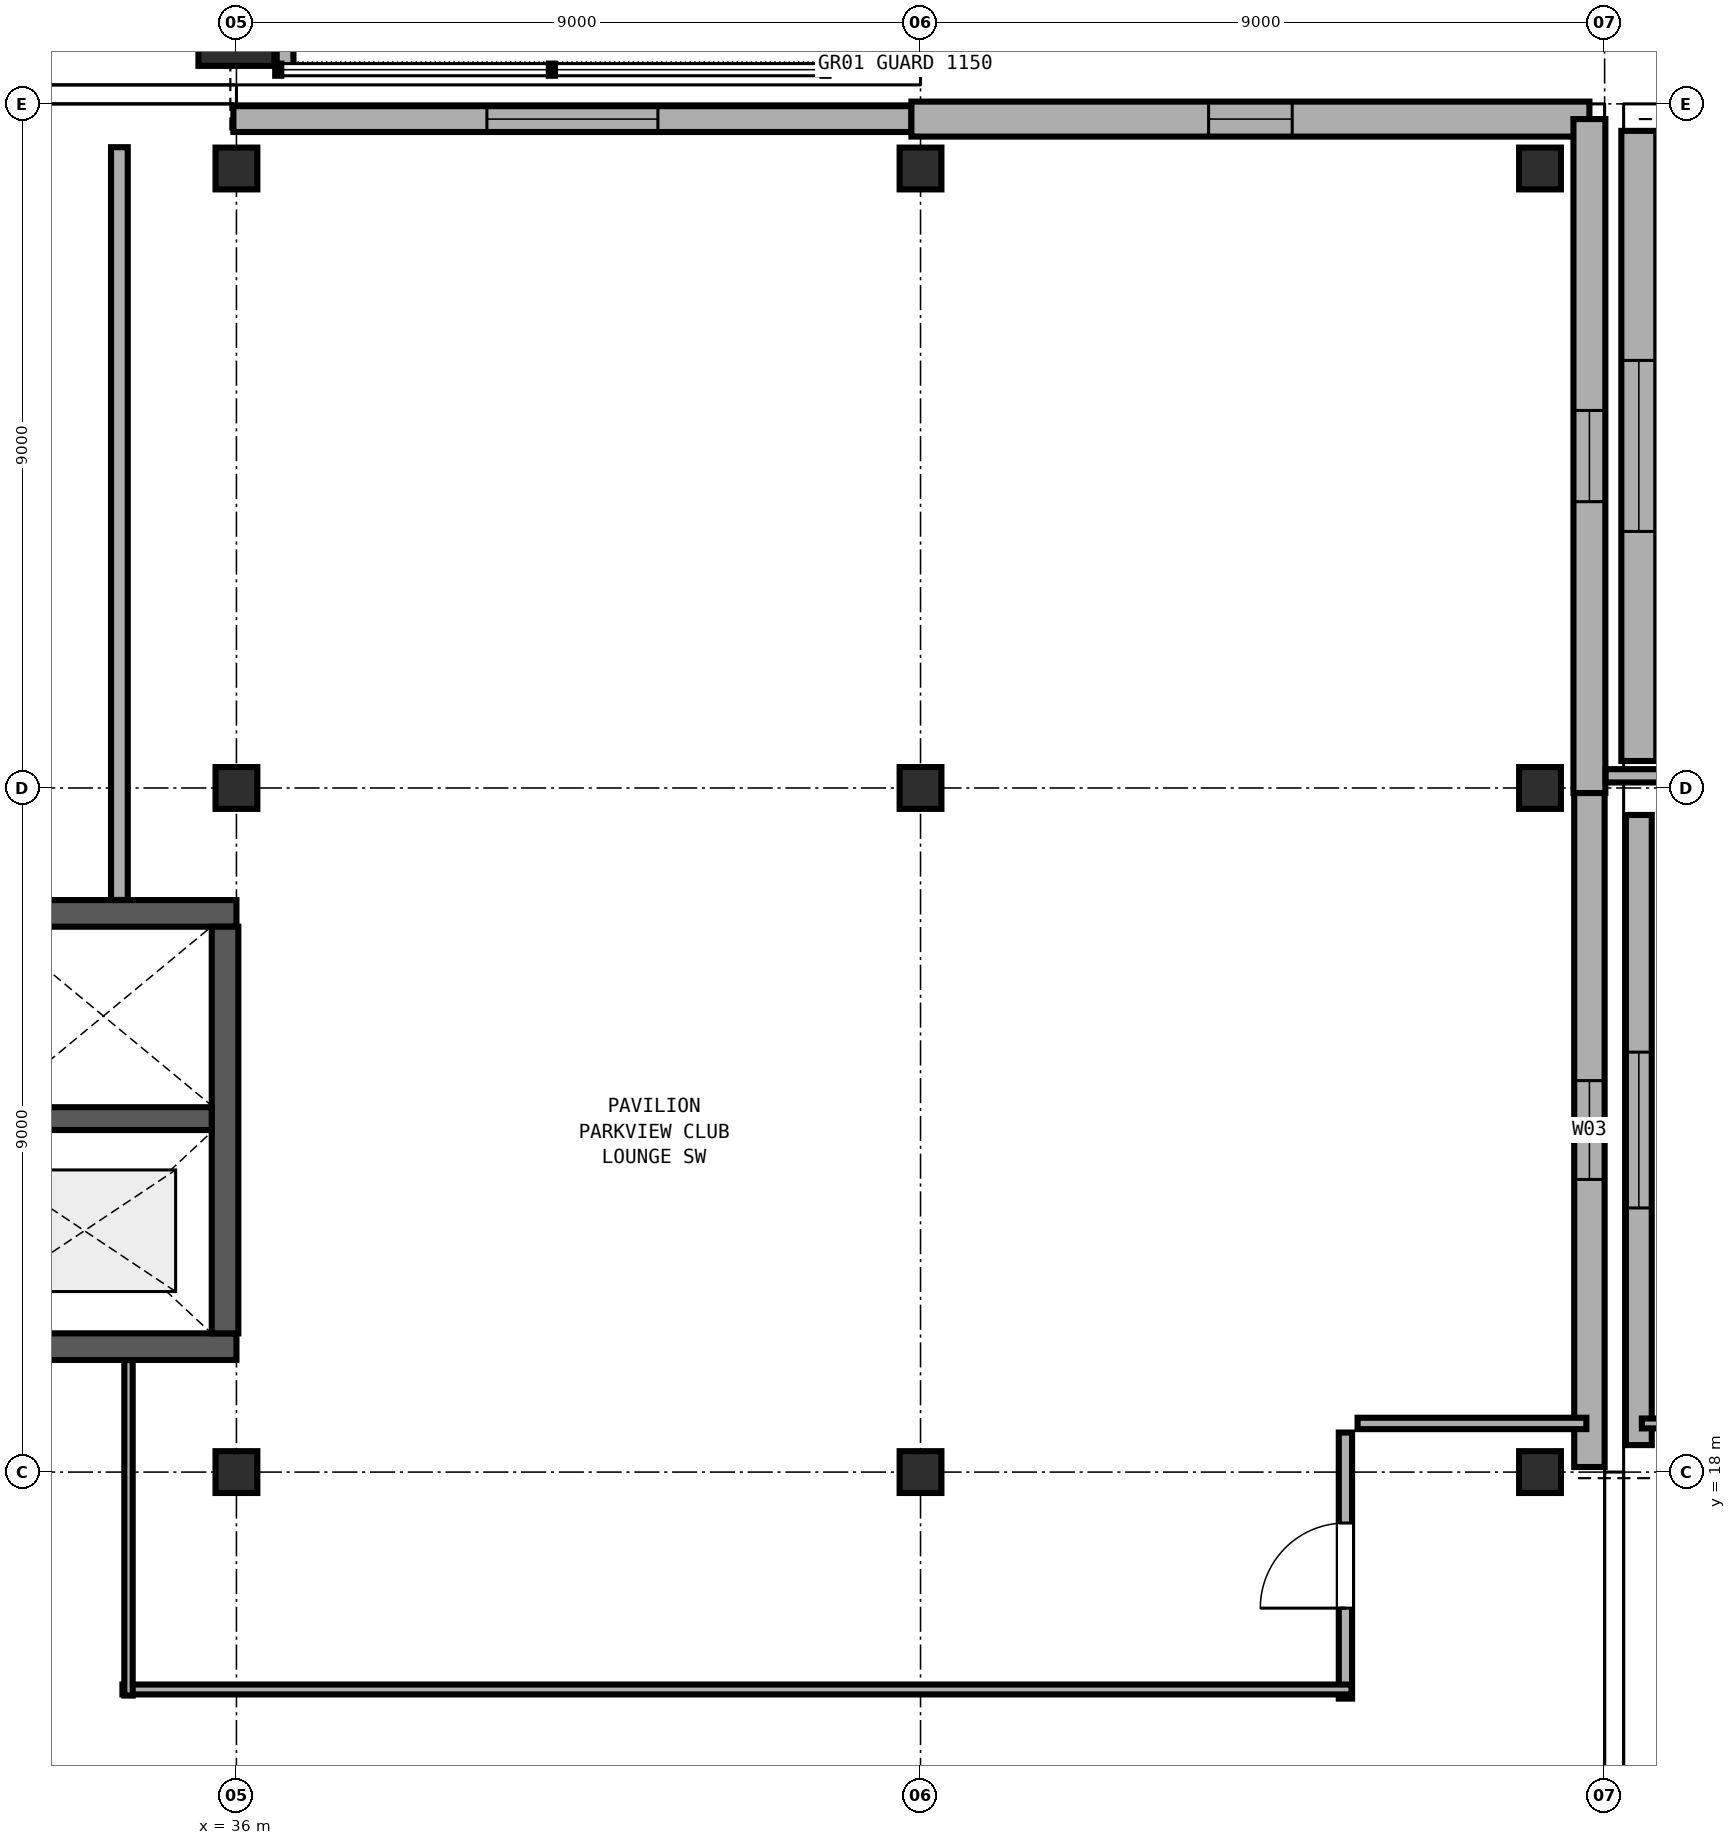
"""IFC4 building model, lengths in metres.
Left out: names, types, materials, properties, quantities, classifications, styles, units other than length and angle.
Written with IfcOpenShell. Run it as: python <this file> out.ifc"""

import sys

from ifc_helpers import new_model, si_unit, direction, frame, frame_2d, origin, origin_2d, place, context, subcontext, project, spatial, rectangle, extrude, element, fill, save


model = new_model("IFC4")
c1 = context("Model", 3, precision=1e-05, world=origin(), true_north=direction((0.0, 1.0)))
c2 = subcontext(c1, "Body", "Model", "MODEL_VIEW")
j1 = project(units=[si_unit("LENGTHUNIT", "METRE"), si_unit("PLANEANGLEUNIT", "RADIAN")], contexts=[c1])
p1 = place(None, origin())
s1 = spatial("IfcSite", under=j1, at=p1, CompositionType="ELEMENT")
p2 = place(p1, origin())
s2 = spatial("IfcBuilding", under=s1, at=p2, CompositionType="ELEMENT")
p3 = place(p2, frame((0.0, 0.0, 9.6)))
s3 = spatial("IfcBuildingStorey", under=s2, at=p3, CompositionType="ELEMENT", Elevation=9.6)
p4 = place(p3, frame((36.0, 37.1, 0.0), z_axis=(0.0, 0.0, 1.0), x_axis=(1.0, 0.0, 0.0)))
e1 = element("IfcColumn", 1, at=p4, inside=s3, PredefinedType="COLUMN", context=c2, shape_type="SweptSolid", body=[
    extrude(rectangle(XDim=1.0, YDim=1.2, at=origin_2d()), origin(), (0.0, 0.0, 1.0), 4.8),
])
p5 = place(p3, frame((44.3, 37.1, 0.0), z_axis=(0.0, 0.0, 1.0), x_axis=(1.0, 0.0, 0.0)))
e2 = element("IfcColumn", 2, at=p5, inside=s3, PredefinedType="COLUMN", context=c2, shape_type="SweptSolid", body=[
    extrude(rectangle(XDim=1.0, YDim=1.0, at=origin_2d()), origin(), (0.0, 0.0, 1.0), 4.8),
])
for number, where, z_axis, x_axis in (
    (3, (36.0, 18.0, 0.0), (0.0, 0.0, 1.0), (1.0, 0.0, 0.0)),
    (4, (36.0, 27.0, 0.0), (0.0, 0.0, 1.0), (1.0, 0.0, 0.0)),
    (5, (36.0, 35.15, 0.0), (0.0, 0.0, 1.0), (1.0, 0.0, 0.0)),
    (6, (45.0, 18.0, 0.0), (0.0, 0.0, 1.0), (1.0, 0.0, 0.0)),
    (7, (45.0, 27.0, 0.0), (0.0, 0.0, 1.0), (1.0, 0.0, 0.0)),
    (8, (45.0, 35.15, 0.0), (0.0, 0.0, 1.0), (1.0, 0.0, 0.0)),
    (9, (53.15, 18.0, 0.0), (0.0, 0.0, 1.0), (1.0, 0.0, 0.0)),
    (10, (53.15, 27.0, 0.0), (0.0, 0.0, 1.0), (1.0, 0.0, 0.0)),
    (11, (53.15, 35.15, 0.0), (0.0, 0.0, 1.0), (1.0, 0.0, 0.0)),
):
    element("IfcColumn", number, at=place(p3, frame(where, z_axis=z_axis, x_axis=x_axis)), inside=s3, PredefinedType="COLUMN", context=c2, shape_type="SweptSolid", body=[
        extrude(rectangle(XDim=0.55, YDim=0.55, at=origin_2d()), origin(), (0.0, 0.0, 1.0), 4.8),
    ])
p6 = place(p3, frame((18.0, 19.65, 0.0), z_axis=(0.0, 0.0, 1.0), x_axis=(1.0, 0.0, 0.0)))
e12 = element("IfcWall", 12, at=p6, inside=s3, PredefinedType="SHEAR", context=c2, shape_type="SweptSolid", body=[
    extrude(rectangle(XDim=18.0, YDim=0.35, at=frame_2d((9.0, 0.0))), origin(), (0.0, 0.0, 1.0), 4.555),
])
p7 = place(p6, frame((11.4, 0.0, 0.0)))
e13 = element("IfcOpeningElement", 13, at=p7, cuts=e12, PredefinedType="OPENING", context=c2, shape_type="SweptSolid", body=[
    extrude(rectangle(XDim=1.9, YDim=2.25, at=frame_2d((0.95, 1.125))), frame((0.0, 0.185, 0.0), z_axis=(0.0, -1.0, 0.0), x_axis=(1.0, 0.0, 0.0)), (0.0, 0.0, 1.0), 0.37),
])
p8 = place(p3, frame((36.0, 25.35, 0.0), z_axis=(0.0, 0.0, 1.0), x_axis=(-1.0, 0.0, 0.0)))
e14 = element("IfcWall", 14, at=p8, inside=s3, PredefinedType="SHEAR", context=c2, shape_type="SweptSolid", body=[
    extrude(rectangle(XDim=18.0, YDim=0.35, at=frame_2d((9.0, 0.0))), origin(), (0.0, 0.0, 1.0), 4.555),
])
p9 = place(p3, frame((35.85, 19.825, 0.0), z_axis=(0.0, 0.0, 1.0), x_axis=(0.0, 1.0, 0.0)))
e15 = element("IfcWall", 15, at=p9, inside=s3, PredefinedType="SHEAR", context=c2, shape_type="SweptSolid", body=[
    extrude(rectangle(XDim=5.35, YDim=0.35, at=frame_2d((2.675, 0.0))), origin(), (0.0, 0.0, 1.0), 4.555),
])
p10 = place(p3, frame((32.8, 22.65, 0.0), z_axis=(0.0, 0.0, 1.0), x_axis=(1.0, 0.0, 0.0)))
e16 = element("IfcWall", 16, at=p10, inside=s3, PredefinedType="SHEAR", context=c2, shape_type="SweptSolid", body=[
    extrude(rectangle(XDim=2.875, YDim=0.3, at=frame_2d((1.438, 0.0))), origin(), (0.0, 0.0, 1.0), 4.555),
])
p11 = place(p3, frame((54.45, 18.355, 0.0), z_axis=(0.0, 0.0, 1.0), x_axis=(0.0, 1.0, 0.0)))
e17 = element("IfcWall", 17, at=p11, inside=s3, PredefinedType="SOLIDWALL", context=c2, shape_type="SweptSolid", body=[
    extrude(rectangle(XDim=8.29, YDim=0.34, at=frame_2d((4.145, 0.0))), origin(), (0.0, 0.0, 1.0), 3.58),
])
p12 = place(p11, frame((3.12, 0.0, 0.9)))
e18 = element("IfcOpeningElement", 18, at=p12, cuts=e17, PredefinedType="OPENING", context=c2, shape_type="SweptSolid", body=[
    extrude(rectangle(XDim=2.05, YDim=2.0, at=frame_2d((1.025, 1.0))), frame((0.0, 0.18, 0.0), z_axis=(0.0, -1.0, 0.0), x_axis=(1.0, 0.0, 0.0)), (0.0, 0.0, 1.0), 0.36),
])
p13 = place(p3, frame((54.45, 27.355, 0.0), z_axis=(0.0, 0.0, 1.0), x_axis=(0.0, 1.0, 0.0)))
e19 = element("IfcWall", 19, at=p13, inside=s3, PredefinedType="SOLIDWALL", context=c2, shape_type="SweptSolid", body=[
    extrude(rectangle(XDim=8.29, YDim=0.46, at=frame_2d((4.145, 0.0))), origin(), (0.0, 0.0, 1.0), 3.58),
])
p14 = place(p13, frame((3.02, 0.0, 0.9)))
e20 = element("IfcOpeningElement", 20, at=p14, cuts=e19, PredefinedType="OPENING", context=c2, shape_type="SweptSolid", body=[
    extrude(rectangle(XDim=2.25, YDim=2.05, at=frame_2d((1.125, 1.025))), frame((0.0, 0.24, 0.0), z_axis=(0.0, -1.0, 0.0), x_axis=(1.0, 0.0, 0.0)), (0.0, 0.0, 1.0), 0.48),
])
p15 = place(p3, frame((35.96, 35.8, 0.0), z_axis=(0.0, 0.0, 1.0), x_axis=(1.0, 0.0, 0.0)))
e21 = element("IfcWall", 21, at=p15, inside=s3, PredefinedType="SOLIDWALL", context=c2, shape_type="SweptSolid", body=[
    extrude(rectangle(XDim=8.92, YDim=0.34, at=frame_2d((4.46, 0.0))), origin(), (0.0, 0.0, 1.0), 3.58),
])
p16 = place(p15, frame((3.335, 0.0, 0.9)))
e22 = element("IfcOpeningElement", 22, at=p16, cuts=e21, PredefinedType="OPENING", context=c2, shape_type="SweptSolid", body=[
    extrude(rectangle(XDim=2.25, YDim=2.05, at=frame_2d((1.125, 1.025))), frame((0.0, 0.18, 0.0), z_axis=(0.0, -1.0, 0.0), x_axis=(1.0, 0.0, 0.0)), (0.0, 0.0, 1.0), 0.36),
])
p17 = place(p3, frame((44.88, 35.8, 0.0), z_axis=(0.0, 0.0, 1.0), x_axis=(1.0, 0.0, 0.0)))
e23 = element("IfcWall", 23, at=p17, inside=s3, PredefinedType="SOLIDWALL", context=c2, shape_type="SweptSolid", body=[
    extrude(rectangle(XDim=8.92, YDim=0.46, at=frame_2d((4.46, 0.0))), origin(), (0.0, 0.0, 1.0), 3.58),
])
p18 = place(p17, frame((3.91, 0.0, 0.9)))
e24 = element("IfcOpeningElement", 24, at=p18, cuts=e23, PredefinedType="OPENING", context=c2, shape_type="SweptSolid", body=[
    extrude(rectangle(XDim=1.1, YDim=1.4, at=frame_2d((0.55, 0.7))), frame((0.0, 0.24, 0.0), z_axis=(0.0, -1.0, 0.0), x_axis=(1.0, 0.0, 0.0)), (0.0, 0.0, 1.0), 0.48),
])
p19 = place(p3, frame((53.8, 35.8, 0.0), z_axis=(0.0, 0.0, 1.0), x_axis=(0.0, -1.0, 0.0)))
e25 = element("IfcWall", 25, at=p19, inside=s3, PredefinedType="SOLIDWALL", context=c2, shape_type="SweptSolid", body=[
    extrude(rectangle(XDim=8.867, YDim=0.42, at=frame_2d((4.433, 0.0))), origin(), (0.0, 0.0, 1.0), 3.58),
])
p20 = place(p19, frame((3.833, 0.0, 0.9)))
e26 = element("IfcOpeningElement", 26, at=p20, cuts=e25, PredefinedType="OPENING", context=c2, shape_type="SweptSolid", body=[
    extrude(rectangle(XDim=1.2, YDim=1.45, at=frame_2d((0.6, 0.725))), frame((0.0, 0.22, 0.0), z_axis=(0.0, -1.0, 0.0), x_axis=(1.0, 0.0, 0.0)), (0.0, 0.0, 1.0), 0.44),
])
p21 = place(p3, frame((53.8, 26.933, 0.0), z_axis=(0.0, 0.0, 1.0), x_axis=(0.0, -1.0, 0.0)))
e27 = element("IfcWall", 27, at=p21, inside=s3, PredefinedType="SOLIDWALL", context=c2, shape_type="SweptSolid", body=[
    extrude(rectangle(XDim=8.867, YDim=0.4, at=frame_2d((4.433, 0.0))), origin(), (0.0, 0.0, 1.0), 3.58),
])
p22 = place(p21, frame((3.783, 0.0, 0.9)))
e28 = element("IfcOpeningElement", 28, at=p22, cuts=e27, PredefinedType="OPENING", context=c2, shape_type="SweptSolid", body=[
    extrude(rectangle(XDim=1.3, YDim=1.5, at=frame_2d((0.65, 0.75))), frame((0.0, 0.21, 0.0), z_axis=(0.0, -1.0, 0.0), x_axis=(1.0, 0.0, 0.0)), (0.0, 0.0, 1.0), 0.42),
])
p23 = place(p3, frame((36.64, 36.49, 0.0), z_axis=(0.0, 0.0, 1.0), x_axis=(0.0, 1.0, 0.0)))
e29 = element("IfcWall", 29, at=p23, inside=s3, PredefinedType="PARTITIONING", context=c2, shape_type="SweptSolid", body=[
    extrude(rectangle(XDim=3.01, YDim=0.22, at=frame_2d((1.505, 0.0))), origin(), (0.0, 0.0, 1.0), 3.56),
])
p24 = place(p3, frame((57.24, 27.16, 0.0), z_axis=(0.0, 0.0, 1.0), x_axis=(-1.0, 0.0, 0.0)))
e30 = element("IfcWall", 30, at=p24, inside=s3, PredefinedType="PARTITIONING", context=c2, shape_type="SweptSolid", body=[
    extrude(rectangle(XDim=3.227, YDim=0.175, at=frame_2d((1.614, 0.0))), origin(), (0.0, 0.0, 1.0), 3.56),
])
p25 = place(p3, frame((57.24, 18.64, 0.0), z_axis=(0.0, 0.0, 1.0), x_axis=(-1.0, 0.0, 0.0)))
e31 = element("IfcWall", 31, at=p25, inside=s3, PredefinedType="PARTITIONING", context=c2, shape_type="SweptSolid", body=[
    extrude(rectangle(XDim=2.75, YDim=0.13, at=frame_2d((1.375, 0.0))), origin(), (0.0, 0.0, 1.0), 3.56),
])
p26 = place(p3, frame((50.59, 15.02, 0.0), z_axis=(0.0, 0.0, 1.0), x_axis=(0.0, 1.0, 0.0)))
e32 = element("IfcWall", 32, at=p26, inside=s3, PredefinedType="PARTITIONING", context=c2, shape_type="SweptSolid", body=[
    extrude(rectangle(XDim=3.5, YDim=0.175, at=frame_2d((1.75, 0.0))), origin(), (0.0, 0.0, 1.0), 3.56),
])
p27 = place(p26, frame((1.19, 0.0, 0.0)))
e33 = element("IfcOpeningElement", 33, at=p27, cuts=e32, PredefinedType="OPENING", context=c2, shape_type="SweptSolid", body=[
    extrude(rectangle(XDim=1.12, YDim=2.22, at=frame_2d((0.56, 1.11))), frame((0.0, 0.097, 0.0), z_axis=(0.0, -1.0, 0.0), x_axis=(1.0, 0.0, 0.0)), (0.0, 0.0, 1.0), 0.195),
])
p28 = place(p3, frame((53.76, 18.64, 0.0), z_axis=(0.0, 0.0, 1.0), x_axis=(-1.0, 0.0, 0.0)))
e34 = element("IfcWall", 34, at=p28, inside=s3, PredefinedType="PARTITIONING", context=c2, shape_type="SweptSolid", body=[
    extrude(rectangle(XDim=3.01, YDim=0.15, at=frame_2d((1.505, 0.0))), origin(), (0.0, 0.0, 1.0), 3.56),
])
p29 = place(p3, frame((50.67, 15.14, 0.0), z_axis=(0.0, 0.0, 1.0), x_axis=(-1.0, 0.0, 0.0)))
e35 = element("IfcWall", 35, at=p29, inside=s3, PredefinedType="PARTITIONING", context=c2, shape_type="SweptSolid", body=[
    extrude(rectangle(XDim=16.17, YDim=0.13, at=frame_2d((8.085, 0.0))), origin(), (0.0, 0.0, 1.0), 3.56),
])
p30 = place(p3, frame((34.58, 15.06, 0.0), z_axis=(0.0, 0.0, 1.0), x_axis=(0.0, 1.0, 0.0)))
e36 = element("IfcWall", 36, at=p30, inside=s3, PredefinedType="PARTITIONING", context=c2, shape_type="SweptSolid", body=[
    extrude(rectangle(XDim=4.413, YDim=0.11, at=frame_2d((2.207, 0.0))), origin(), (0.0, 0.0, 1.0), 3.56),
])
p31 = place(p3, frame((34.46, 25.527, 0.0), z_axis=(0.0, 0.0, 1.0), x_axis=(0.0, 1.0, 0.0)))
e37 = element("IfcWall", 37, at=p31, inside=s3, PredefinedType="PARTITIONING", context=c2, shape_type="SweptSolid", body=[
    extrude(rectangle(XDim=9.903, YDim=0.22, at=frame_2d((4.951, 0.0))), origin(), (0.0, 0.0, 1.0), 3.56),
])
p32 = place(p12, origin())
e38 = element("IfcWindow", 38, at=p32, inside=s3, PartitioningType="DOUBLE_PANEL_VERTICAL", PredefinedType="WINDOW", context=c2, shape_type="SweptSolid", body=[
    extrude(rectangle(XDim=2.05, YDim=2.0, at=frame_2d((1.025, 1.0))), frame((0.0, 0.03, 0.0), z_axis=(0.0, -1.0, 0.0), x_axis=(1.0, 0.0, 0.0)), (0.0, 0.0, 1.0), 0.06),
])
fill(e18, e38)
p33 = place(p14, origin())
e39 = element("IfcWindow", 39, at=p33, inside=s3, PartitioningType="DOUBLE_PANEL_VERTICAL", PredefinedType="WINDOW", context=c2, shape_type="SweptSolid", body=[
    extrude(rectangle(XDim=2.25, YDim=2.05, at=frame_2d((1.125, 1.025))), frame((0.0, 0.03, 0.0), z_axis=(0.0, -1.0, 0.0), x_axis=(1.0, 0.0, 0.0)), (0.0, 0.0, 1.0), 0.06),
])
fill(e20, e39)
p34 = place(p16, origin())
e40 = element("IfcWindow", 40, at=p34, inside=s3, PartitioningType="DOUBLE_PANEL_VERTICAL", PredefinedType="WINDOW", context=c2, shape_type="SweptSolid", body=[
    extrude(rectangle(XDim=2.25, YDim=2.05, at=frame_2d((1.125, 1.025))), frame((0.0, 0.03, 0.0), z_axis=(0.0, -1.0, 0.0), x_axis=(1.0, 0.0, 0.0)), (0.0, 0.0, 1.0), 0.06),
])
fill(e22, e40)
p35 = place(p18, origin())
e41 = element("IfcWindow", 41, at=p35, inside=s3, PartitioningType="SINGLE_PANEL", PredefinedType="WINDOW", context=c2, shape_type="SweptSolid", body=[
    extrude(rectangle(XDim=1.1, YDim=1.4, at=frame_2d((0.55, 0.7))), frame((0.0, 0.03, 0.0), z_axis=(0.0, -1.0, 0.0), x_axis=(1.0, 0.0, 0.0)), (0.0, 0.0, 1.0), 0.06),
])
fill(e24, e41)
p36 = place(p20, origin())
e42 = element("IfcWindow", 42, at=p36, inside=s3, PartitioningType="SINGLE_PANEL", PredefinedType="WINDOW", context=c2, shape_type="SweptSolid", body=[
    extrude(rectangle(XDim=1.2, YDim=1.45, at=frame_2d((0.6, 0.725))), frame((0.0, 0.03, 0.0), z_axis=(0.0, -1.0, 0.0), x_axis=(1.0, 0.0, 0.0)), (0.0, 0.0, 1.0), 0.06),
])
fill(e26, e42)
p37 = place(p22, origin())
e43 = element("IfcWindow", 43, at=p37, inside=s3, PartitioningType="SINGLE_PANEL", PredefinedType="WINDOW", context=c2, shape_type="SweptSolid", body=[
    extrude(rectangle(XDim=1.3, YDim=1.5, at=frame_2d((0.65, 0.75))), frame((0.0, 0.03, 0.0), z_axis=(0.0, -1.0, 0.0), x_axis=(1.0, 0.0, 0.0)), (0.0, 0.0, 1.0), 0.06),
])
fill(e28, e43)
p38 = place(p27, origin())
e44 = element("IfcDoor", 44, at=p38, inside=s3, OperationType="SINGLE_SWING_LEFT", PredefinedType="DOOR", context=c2, shape_type="SweptSolid", body=[
    extrude(rectangle(XDim=1.12, YDim=2.22, at=frame_2d((0.56, 1.11))), frame((0.0, 0.025, 0.0), z_axis=(0.0, -1.0, 0.0), x_axis=(1.0, 0.0, 0.0)), (0.0, 0.0, 1.0), 0.05),
])
fill(e33, e44)
save(model, sys.argv[1])
